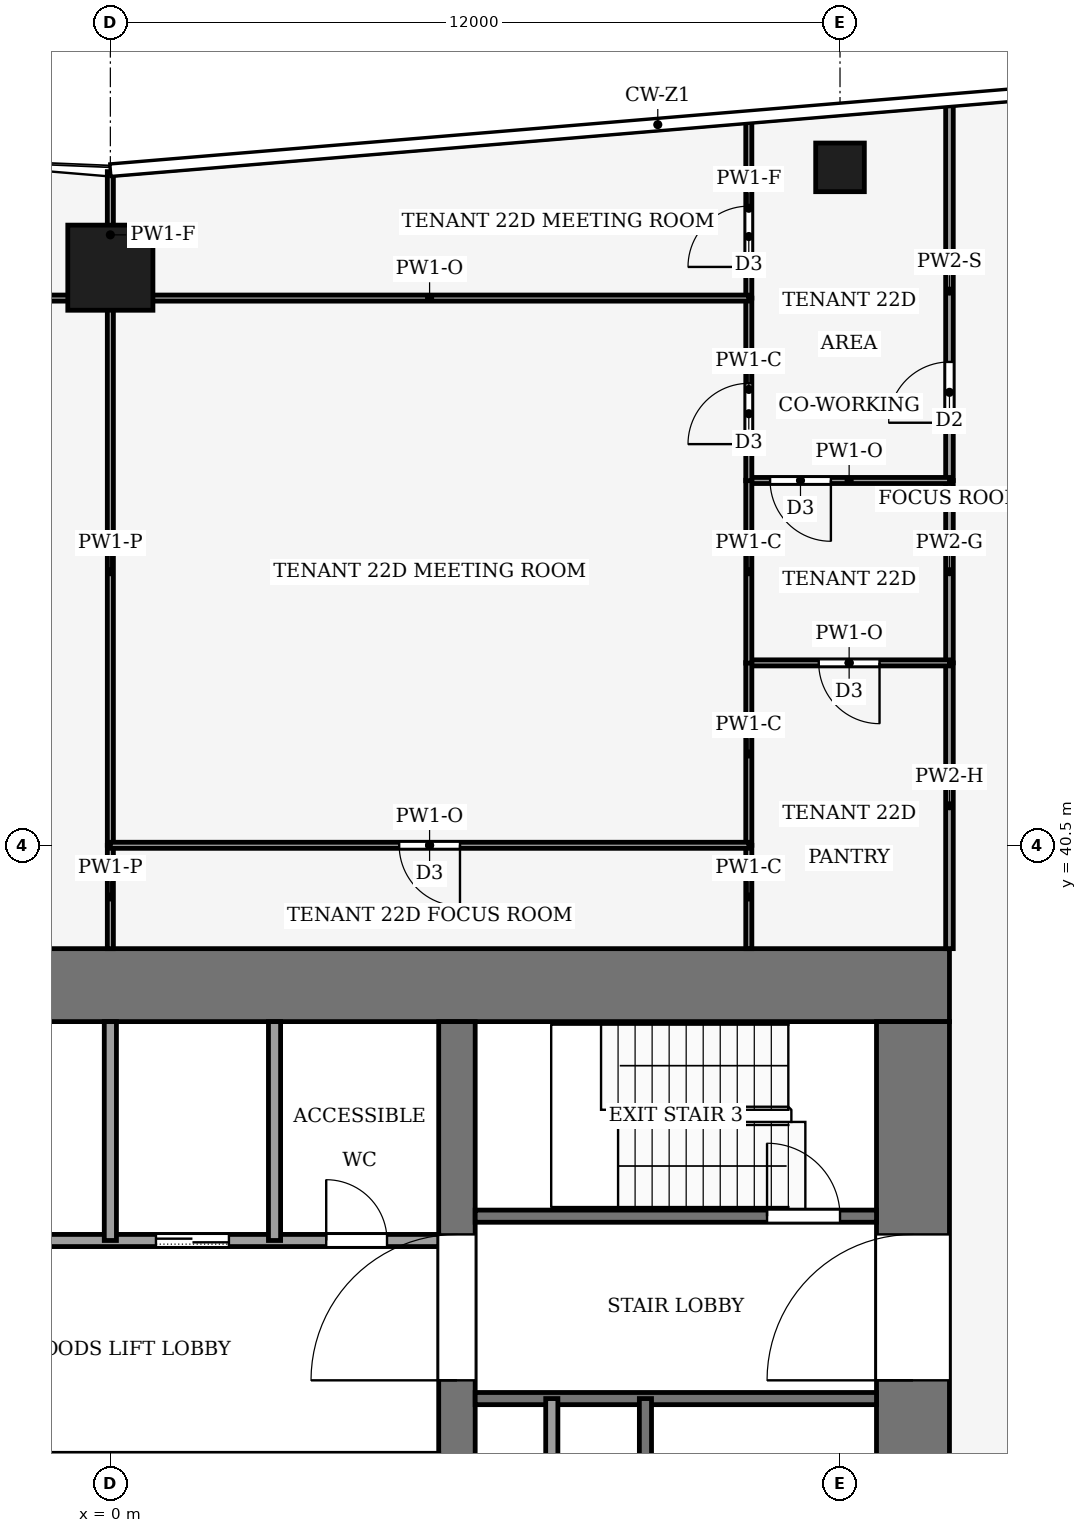
"""IFC4 building model, lengths in metres.
Left out: names, types, materials, properties, quantities, classifications, styles, units other than length and angle.
Written with IfcOpenShell. Run it as: python <this file> out.ifc"""

import sys

from ifc_helpers import new_model, si_unit, direction, frame, frame_2d, origin, origin_2d, place, context, subcontext, project, spatial, rectangle, hollow_rectangle, extrude, element, fill, save


model = new_model("IFC4")
c1 = context("Model", 3, precision=1e-05, world=origin(), true_north=direction((0.0, 1.0)))
c2 = subcontext(c1, "Body", "Model", "MODEL_VIEW")
j1 = project(units=[si_unit("LENGTHUNIT", "METRE"), si_unit("PLANEANGLEUNIT", "RADIAN")], contexts=[c1])
p1 = place(None, origin())
s1 = spatial("IfcSite", under=j1, at=p1, CompositionType="ELEMENT")
p2 = place(p1, origin())
s2 = spatial("IfcBuilding", under=s1, at=p2, CompositionType="ELEMENT")
p3 = place(p2, frame((0.0, 0.0, 98.0)))
s3 = spatial("IfcBuildingStorey", under=s2, at=p3, CompositionType="ELEMENT", Elevation=98.0)
p4 = place(p3, frame((-13.8, 38.2, -0.13), z_axis=(0.0, 0.0, 1.0), x_axis=(1.0, 0.0, 0.0)))
e1 = element("IfcWall", 1, at=p4, inside=s3, PredefinedType="SHEAR", context=c2, shape_type="SweptSolid", body=[
    extrude(rectangle(XDim=27.6, YDim=1.2, at=frame_2d((13.8, 0.0))), origin(), (0.0, 0.0, 1.0), 4.0),
])
p5 = place(p3, frame((13.2, 18.4, -0.13), z_axis=(0.0, 0.0, 1.0), x_axis=(0.0, 1.0, 0.0)))
e2 = element("IfcWall", 2, at=p5, inside=s3, PredefinedType="SHEAR", context=c2, shape_type="SweptSolid", body=[
    extrude(rectangle(XDim=19.2, YDim=1.2, at=frame_2d((9.6, 0.0))), origin(), (0.0, 0.0, 1.0), 4.0),
])
p6 = place(p5, frame((2.8, 0.0, 0.13)))
e3 = element("IfcOpeningElement", 3, at=p6, cuts=e2, PredefinedType="OPENING", context=c2, shape_type="SweptSolid", body=[
    extrude(rectangle(XDim=2.4, YDim=2.4, at=frame_2d((1.2, 1.2))), frame((0.0, 0.61, 0.0), z_axis=(0.0, -1.0, 0.0), x_axis=(1.0, 0.0, 0.0)), (0.0, 0.0, 1.0), 1.22),
])
p7 = place(p5, frame((13.3, 0.0, 0.13)))
e4 = element("IfcOpeningElement", 4, at=p7, cuts=e2, PredefinedType="OPENING", context=c2, shape_type="SweptSolid", body=[
    extrude(rectangle(XDim=2.4, YDim=2.4, at=frame_2d((1.2, 1.2))), frame((0.0, 0.61, 0.0), z_axis=(0.0, -1.0, 0.0), x_axis=(1.0, 0.0, 0.0)), (0.0, 0.0, 1.0), 1.22),
])
p8 = place(p3, frame((5.7, 18.4, -0.13), z_axis=(0.0, 0.0, 1.0), x_axis=(0.0, 1.0, 0.0)))
e5 = element("IfcWall", 5, at=p8, inside=s3, PredefinedType="SHEAR", context=c2, shape_type="SweptSolid", body=[
    extrude(rectangle(XDim=19.2, YDim=0.6, at=frame_2d((9.6, 0.0))), origin(), (0.0, 0.0, 1.0), 4.0),
])
p9 = place(p8, frame((13.3, 0.0, 0.13)))
e6 = element("IfcOpeningElement", 6, at=p9, cuts=e5, PredefinedType="OPENING", context=c2, shape_type="SweptSolid", body=[
    extrude(rectangle(XDim=2.4, YDim=2.4, at=frame_2d((1.2, 1.2))), frame((0.0, 0.31, 0.0), z_axis=(0.0, -1.0, 0.0), x_axis=(1.0, 0.0, 0.0)), (0.0, 0.0, 1.0), 0.62),
])
p10 = place(p3, frame((0.0, 50.0, 0.0), z_axis=(0.0, 0.0, 1.0), x_axis=(1.0, 0.0, 0.0)))
e7 = element("IfcColumn", 7, at=p10, inside=s3, PredefinedType="COLUMN", context=c2, shape_type="SweptSolid", body=[
    extrude(hollow_rectangle(XDim=1.4, YDim=1.4, WallThickness=0.08, at=origin_2d()), origin(), (0.0, 0.0, 1.0), 4.0),
])
p11 = place(p3, frame((12.0, 51.65, 0.0), z_axis=(0.0, 0.0, 1.0), x_axis=(1.0, 0.0, 0.0)))
e8 = element("IfcColumn", 8, at=p11, inside=s3, PredefinedType="COLUMN", context=c2, shape_type="SweptSolid", body=[
    extrude(hollow_rectangle(XDim=0.8, YDim=0.8, WallThickness=0.04, at=origin_2d()), origin(), (0.0, 0.0, 1.0), 4.0),
])
p12 = place(p3, frame((6.0, 31.4, 0.0), z_axis=(0.0, 0.0, 1.0), x_axis=(1.0, 0.0, 0.0)))
e9 = element("IfcWall", 9, at=p12, inside=s3, PredefinedType="PARTITIONING", context=c2, shape_type="SweptSolid", body=[
    extrude(rectangle(XDim=6.6, YDim=0.2, at=frame_2d((3.3, 0.0))), origin(), (0.0, 0.0, 1.0), 3.87),
])
p13 = place(p3, frame((-5.4, 34.0, 0.0), z_axis=(0.0, 0.0, 1.0), x_axis=(1.0, 0.0, 0.0)))
e10 = element("IfcWall", 10, at=p13, inside=s3, PredefinedType="PARTITIONING", context=c2, shape_type="SweptSolid", body=[
    extrude(rectangle(XDim=10.8, YDim=0.2, at=frame_2d((5.4, 0.0))), origin(), (0.0, 0.0, 1.0), 3.87),
])
p14 = place(p13, frame((6.15, 0.0, 0.0)))
e11 = element("IfcOpeningElement", 11, at=p14, cuts=e10, PredefinedType="OPENING", context=c2, shape_type="SweptSolid", body=[
    extrude(rectangle(XDim=1.2, YDim=2.2, at=frame_2d((0.6, 1.1))), frame((0.0, 0.11, 0.0), z_axis=(0.0, -1.0, 0.0), x_axis=(1.0, 0.0, 0.0)), (0.0, 0.0, 1.0), 0.22),
])
p15 = place(p13, frame((8.95, 0.0, 0.0)))
e12 = element("IfcOpeningElement", 12, at=p15, cuts=e10, PredefinedType="OPENING", context=c2, shape_type="SweptSolid", body=[
    extrude(rectangle(XDim=1.0, YDim=2.1, at=frame_2d((0.5, 1.05))), frame((0.0, 0.11, 0.0), z_axis=(0.0, -1.0, 0.0), x_axis=(1.0, 0.0, 0.0)), (0.0, 0.0, 1.0), 0.22),
])
p16 = place(p3, frame((6.0, 34.4, 0.0), z_axis=(0.0, 0.0, 1.0), x_axis=(1.0, 0.0, 0.0)))
e13 = element("IfcWall", 13, at=p16, inside=s3, PredefinedType="PARTITIONING", context=c2, shape_type="SweptSolid", body=[
    extrude(rectangle(XDim=6.6, YDim=0.2, at=frame_2d((3.3, 0.0))), origin(), (0.0, 0.0, 1.0), 3.87),
])
p17 = place(p16, frame((4.8, 0.0, 0.0)))
e14 = element("IfcOpeningElement", 14, at=p17, cuts=e13, PredefinedType="OPENING", context=c2, shape_type="SweptSolid", body=[
    extrude(rectangle(XDim=1.2, YDim=2.2, at=frame_2d((0.6, 1.1))), frame((0.0, 0.11, 0.0), z_axis=(0.0, -1.0, 0.0), x_axis=(1.0, 0.0, 0.0)), (0.0, 0.0, 1.0), 0.22),
])
for number, where, z_axis, x_axis in (
    (15, (0.0, 34.0, 0.0), (0.0, 0.0, 1.0), (0.0, 1.0, 0.0)),
    (16, (2.7, 34.0, 0.0), (0.0, 0.0, 1.0), (0.0, 1.0, 0.0)),
):
    element("IfcWall", number, at=place(p3, frame(where, z_axis=z_axis, x_axis=x_axis)), inside=s3, PredefinedType="PARTITIONING", context=c2, shape_type="SweptSolid", body=[
        extrude(rectangle(XDim=3.6, YDim=0.2, at=frame_2d((1.8, 0.0))), origin(), (0.0, 0.0, 1.0), 3.87),
    ])
for number, where, z_axis, x_axis in (
    (17, (7.26, 24.0, 0.0), (0.0, 0.0, 1.0), (0.0, 1.0, 0.0)),
    (18, (8.8, 24.0, 0.0), (0.0, 0.0, 1.0), (0.0, 1.0, 0.0)),
):
    element("IfcWall", number, at=place(p3, frame(where, z_axis=z_axis, x_axis=x_axis)), inside=s3, PredefinedType="PARTITIONING", context=c2, shape_type="SweptSolid", body=[
        extrude(rectangle(XDim=7.4, YDim=0.2, at=frame_2d((3.7, 0.0))), origin(), (0.0, 0.0, 1.0), 3.87),
    ])
p18 = place(p3, frame((13.8, 43.5, 0.0), z_axis=(0.0, 0.0, 1.0), x_axis=(0.0, -1.0, 0.0)))
e19 = element("IfcWall", 19, at=p18, inside=s3, PredefinedType="PARTITIONING", context=c2, shape_type="SweptSolid", body=[
    extrude(rectangle(XDim=4.7, YDim=0.125, at=frame_2d((2.35, 0.0))), origin(), (0.0, 0.0, 1.0), 3.14),
])
p19 = place(p3, frame((13.8, 46.5, 0.0), z_axis=(0.0, 0.0, 1.0), x_axis=(0.0, -1.0, 0.0)))
e20 = element("IfcWall", 20, at=p19, inside=s3, PredefinedType="PARTITIONING", context=c2, shape_type="SweptSolid", body=[
    extrude(rectangle(XDim=3.0, YDim=0.125, at=frame_2d((1.5, 0.0))), origin(), (0.0, 0.0, 1.0), 3.87),
])
p20 = place(p3, frame((13.8, 46.5, 0.0), z_axis=(0.0, 0.0, 1.0), x_axis=(0.0, 1.0, 0.0)))
e21 = element("IfcWall", 21, at=p20, inside=s3, PredefinedType="PARTITIONING", context=c2, shape_type="SweptSolid", body=[
    extrude(rectangle(XDim=6.23, YDim=0.125, at=frame_2d((3.115, 0.0))), origin(), (0.0, 0.0, 1.0), 3.04),
])
p21 = place(p20, frame((0.95, 0.0, 0.0)))
e22 = element("IfcOpeningElement", 22, at=p21, cuts=e21, PredefinedType="OPENING", context=c2, shape_type="SweptSolid", body=[
    extrude(rectangle(XDim=1.0, YDim=2.1, at=frame_2d((0.5, 1.05))), frame((0.0, 0.073, 0.0), z_axis=(0.0, -1.0, 0.0), x_axis=(1.0, 0.0, 0.0)), (0.0, 0.0, 1.0), 0.145),
])
p22 = place(p3, frame((-7.5, 49.5, 0.0), z_axis=(0.0, 0.0, 1.0), x_axis=(1.0, 0.0, 0.0)))
e23 = element("IfcWall", 23, at=p22, inside=s3, PredefinedType="PARTITIONING", context=c2, shape_type="SweptSolid", body=[
    extrude(rectangle(XDim=7.5, YDim=0.1, at=frame_2d((3.75, 0.0))), origin(), (0.0, 0.0, 1.0), 3.39),
])
p23 = place(p22, frame((2.85, 0.0, 0.0)))
e24 = element("IfcOpeningElement", 24, at=p23, cuts=e23, PredefinedType="OPENING", context=c2, shape_type="SweptSolid", body=[
    extrude(rectangle(XDim=1.0, YDim=2.1, at=frame_2d((0.5, 1.05))), frame((0.0, 0.06, 0.0), z_axis=(0.0, -1.0, 0.0), x_axis=(1.0, 0.0, 0.0)), (0.0, 0.0, 1.0), 0.12),
])
p24 = place(p3, frame((0.0, 38.8, 0.0), z_axis=(0.0, 0.0, 1.0), x_axis=(0.0, 1.0, 0.0)))
e25 = element("IfcWall", 25, at=p24, inside=s3, PredefinedType="PARTITIONING", context=c2, shape_type="SweptSolid", body=[
    extrude(rectangle(XDim=1.7, YDim=0.1, at=frame_2d((0.85, 0.0))), origin(), (0.0, 0.0, 1.0), 3.44),
])
p25 = place(p3, frame((0.0, 40.5, 0.0), z_axis=(0.0, 0.0, 1.0), x_axis=(0.0, 1.0, 0.0)))
e26 = element("IfcWall", 26, at=p25, inside=s3, PredefinedType="PARTITIONING", context=c2, shape_type="SweptSolid", body=[
    extrude(rectangle(XDim=9.0, YDim=0.1, at=frame_2d((4.5, 0.0))), origin(), (0.0, 0.0, 1.0), 3.44),
])
p26 = place(p3, frame((0.0, 49.5, 0.0), z_axis=(0.0, 0.0, 1.0), x_axis=(0.0, 1.0, 0.0)))
e27 = element("IfcWall", 27, at=p26, inside=s3, PredefinedType="PARTITIONING", context=c2, shape_type="SweptSolid", body=[
    extrude(rectangle(XDim=2.08, YDim=0.1, at=frame_2d((1.04, 0.0))), origin(), (0.0, 0.0, 1.0), 3.04),
])
p27 = place(p3, frame((13.8, 43.5, 0.0), z_axis=(0.0, 0.0, 1.0), x_axis=(-1.0, 0.0, 0.0)))
e28 = element("IfcWall", 28, at=p27, inside=s3, PredefinedType="PARTITIONING", context=c2, shape_type="SweptSolid", body=[
    extrude(rectangle(XDim=3.3, YDim=0.1, at=frame_2d((1.65, 0.0))), origin(), (0.0, 0.0, 1.0), 3.39),
])
p28 = place(p27, frame((1.15, 0.0, 0.0)))
e29 = element("IfcOpeningElement", 29, at=p28, cuts=e28, PredefinedType="OPENING", context=c2, shape_type="SweptSolid", body=[
    extrude(rectangle(XDim=1.0, YDim=2.1, at=frame_2d((0.5, 1.05))), frame((0.0, 0.06, 0.0), z_axis=(0.0, -1.0, 0.0), x_axis=(1.0, 0.0, 0.0)), (0.0, 0.0, 1.0), 0.12),
])
p29 = place(p3, frame((10.5, 40.5, 0.0), z_axis=(0.0, 0.0, 1.0), x_axis=(0.0, -1.0, 0.0)))
e30 = element("IfcWall", 30, at=p29, inside=s3, PredefinedType="PARTITIONING", context=c2, shape_type="SweptSolid", body=[
    extrude(rectangle(XDim=1.7, YDim=0.1, at=frame_2d((0.85, 0.0))), origin(), (0.0, 0.0, 1.0), 3.87),
])
p30 = place(p3, frame((10.5, 43.504, 0.0), z_axis=(0.0, 0.0, 1.0), x_axis=(0.0, -1.0, 0.0)))
e31 = element("IfcWall", 31, at=p30, inside=s3, PredefinedType="PARTITIONING", context=c2, shape_type="SweptSolid", body=[
    extrude(rectangle(XDim=3.004, YDim=0.1, at=frame_2d((1.502, 0.0))), origin(), (0.0, 0.0, 1.0), 3.87),
])
p31 = place(p3, frame((13.8, 46.5, 0.0), z_axis=(0.0, 0.0, 1.0), x_axis=(-1.0, 0.0, 0.0)))
e32 = element("IfcWall", 32, at=p31, inside=s3, PredefinedType="PARTITIONING", context=c2, shape_type="SweptSolid", body=[
    extrude(rectangle(XDim=3.3, YDim=0.1, at=frame_2d((1.65, 0.0))), origin(), (0.0, 0.0, 1.0), 3.39),
])
p32 = place(p31, frame((1.95, 0.0, 0.0)))
e33 = element("IfcOpeningElement", 33, at=p32, cuts=e32, PredefinedType="OPENING", context=c2, shape_type="SweptSolid", body=[
    extrude(rectangle(XDim=1.0, YDim=2.1, at=frame_2d((0.5, 1.05))), frame((0.0, 0.06, 0.0), z_axis=(0.0, -1.0, 0.0), x_axis=(1.0, 0.0, 0.0)), (0.0, 0.0, 1.0), 0.12),
])
p33 = place(p3, frame((10.5, 46.504, 0.0), z_axis=(0.0, 0.0, 1.0), x_axis=(0.0, -1.0, 0.0)))
e34 = element("IfcWall", 34, at=p33, inside=s3, PredefinedType="PARTITIONING", context=c2, shape_type="SweptSolid", body=[
    extrude(rectangle(XDim=3.008, YDim=0.1, at=frame_2d((1.504, 0.0))), origin(), (0.0, 0.0, 1.0), 3.87),
])
p34 = place(p3, frame((10.5, 46.496, 0.0), z_axis=(0.0, 0.0, 1.0), x_axis=(0.0, 1.0, 0.0)))
e35 = element("IfcWall", 35, at=p34, inside=s3, PredefinedType="PARTITIONING", context=c2, shape_type="SweptSolid", body=[
    extrude(rectangle(XDim=3.004, YDim=0.1, at=frame_2d((1.502, 0.0))), origin(), (0.0, 0.0, 1.0), 3.87),
])
p35 = place(p34, frame((0.602, 0.0, 0.0)))
e36 = element("IfcOpeningElement", 36, at=p35, cuts=e35, PredefinedType="OPENING", context=c2, shape_type="SweptSolid", body=[
    extrude(rectangle(XDim=1.0, YDim=2.1, at=frame_2d((0.5, 1.05))), frame((0.0, 0.06, 0.0), z_axis=(0.0, -1.0, 0.0), x_axis=(1.0, 0.0, 0.0)), (0.0, 0.0, 1.0), 0.12),
])
p36 = place(p3, frame((10.5, 49.5, 0.0), z_axis=(0.0, 0.0, 1.0), x_axis=(0.0, 1.0, 0.0)))
e37 = element("IfcWall", 37, at=p36, inside=s3, PredefinedType="PARTITIONING", context=c2, shape_type="SweptSolid", body=[
    extrude(rectangle(XDim=2.955, YDim=0.1, at=frame_2d((1.478, 0.0))), origin(), (0.0, 0.0, 1.0), 3.04),
])
p37 = place(p36, frame((0.512, 0.0, 0.0)))
e38 = element("IfcOpeningElement", 38, at=p37, cuts=e37, PredefinedType="OPENING", context=c2, shape_type="SweptSolid", body=[
    extrude(rectangle(XDim=1.0, YDim=2.1, at=frame_2d((0.5, 1.05))), frame((0.0, 0.06, 0.0), z_axis=(0.0, -1.0, 0.0), x_axis=(1.0, 0.0, 0.0)), (0.0, 0.0, 1.0), 0.12),
])
p38 = place(p3, frame((10.5, 40.5, 0.0), z_axis=(0.0, 0.0, 1.0), x_axis=(-1.0, 0.0, 0.0)))
e39 = element("IfcWall", 39, at=p38, inside=s3, PredefinedType="PARTITIONING", context=c2, shape_type="SweptSolid", body=[
    extrude(rectangle(XDim=10.5, YDim=0.1, at=frame_2d((5.25, 0.0))), origin(), (0.0, 0.0, 1.0), 3.39),
])
p39 = place(p38, frame((4.75, 0.0, 0.0)))
e40 = element("IfcOpeningElement", 40, at=p39, cuts=e39, PredefinedType="OPENING", context=c2, shape_type="SweptSolid", body=[
    extrude(rectangle(XDim=1.0, YDim=2.1, at=frame_2d((0.5, 1.05))), frame((0.0, 0.06, 0.0), z_axis=(0.0, -1.0, 0.0), x_axis=(1.0, 0.0, 0.0)), (0.0, 0.0, 1.0), 0.12),
])
p40 = place(p3, frame((10.5, 49.5, 0.0), z_axis=(0.0, 0.0, 1.0), x_axis=(-1.0, 0.0, 0.0)))
e41 = element("IfcWall", 41, at=p40, inside=s3, PredefinedType="PARTITIONING", context=c2, shape_type="SweptSolid", body=[
    extrude(rectangle(XDim=10.5, YDim=0.1, at=frame_2d((5.25, 0.0))), origin(), (0.0, 0.0, 1.0), 3.39),
])
p41 = place(p14, origin())
e42 = element("IfcDoor", 42, at=p41, inside=s3, OperationType="SLIDING_TO_LEFT", PredefinedType="DOOR", context=c2, shape_type="SweptSolid", body=[
    extrude(rectangle(XDim=1.2, YDim=2.2, at=frame_2d((0.6, 1.1))), frame((0.0, 0.025, 0.0), z_axis=(0.0, -1.0, 0.0), x_axis=(1.0, 0.0, 0.0)), (0.0, 0.0, 1.0), 0.05),
])
fill(e11, e42)
p42 = place(p15, origin())
e43 = element("IfcDoor", 43, at=p42, inside=s3, OperationType="SINGLE_SWING_LEFT", PredefinedType="DOOR", context=c2, shape_type="SweptSolid", body=[
    extrude(rectangle(XDim=1.0, YDim=2.1, at=frame_2d((0.5, 1.05))), frame((0.0, 0.025, 0.0), z_axis=(0.0, -1.0, 0.0), x_axis=(1.0, 0.0, 0.0)), (0.0, 0.0, 1.0), 0.05),
])
fill(e12, e43)
p43 = place(p17, origin())
e44 = element("IfcDoor", 44, at=p43, inside=s3, OperationType="SINGLE_SWING_RIGHT", PredefinedType="DOOR", context=c2, shape_type="SweptSolid", body=[
    extrude(rectangle(XDim=1.2, YDim=2.2, at=frame_2d((0.6, 1.1))), frame((0.0, 0.025, 0.0), z_axis=(0.0, -1.0, 0.0), x_axis=(1.0, 0.0, 0.0)), (0.0, 0.0, 1.0), 0.05),
])
fill(e14, e44)
p44 = place(p9, origin())
e45 = element("IfcDoor", 45, at=p44, inside=s3, OperationType="DOUBLE_DOOR_SINGLE_SWING", PredefinedType="DOOR", context=c2, shape_type="SweptSolid", body=[
    extrude(rectangle(XDim=2.4, YDim=2.4, at=frame_2d((1.2, 1.2))), frame((0.0, 0.025, 0.0), z_axis=(0.0, -1.0, 0.0), x_axis=(1.0, 0.0, 0.0)), (0.0, 0.0, 1.0), 0.05),
])
fill(e6, e45)
p45 = place(p7, origin())
e46 = element("IfcDoor", 46, at=p45, inside=s3, OperationType="DOUBLE_DOOR_SINGLE_SWING", PredefinedType="DOOR", context=c2, shape_type="SweptSolid", body=[
    extrude(rectangle(XDim=2.4, YDim=2.4, at=frame_2d((1.2, 1.2))), frame((0.0, 0.025, 0.0), z_axis=(0.0, -1.0, 0.0), x_axis=(1.0, 0.0, 0.0)), (0.0, 0.0, 1.0), 0.05),
])
fill(e4, e46)
p46 = place(p21, origin())
e47 = element("IfcDoor", 47, at=p46, inside=s3, OperationType="SINGLE_SWING_LEFT", PredefinedType="DOOR", context=c2, shape_type="SweptSolid", body=[
    extrude(rectangle(XDim=1.0, YDim=2.1, at=frame_2d((0.5, 1.05))), frame((0.0, 0.025, 0.0), z_axis=(0.0, -1.0, 0.0), x_axis=(1.0, 0.0, 0.0)), (0.0, 0.0, 1.0), 0.05),
])
fill(e22, e47)
p47 = place(p28, origin())
e48 = element("IfcDoor", 48, at=p47, inside=s3, OperationType="SINGLE_SWING_RIGHT", PredefinedType="DOOR", context=c2, shape_type="SweptSolid", body=[
    extrude(rectangle(XDim=1.0, YDim=2.1, at=frame_2d((0.5, 1.05))), frame((0.0, 0.025, 0.0), z_axis=(0.0, -1.0, 0.0), x_axis=(1.0, 0.0, 0.0)), (0.0, 0.0, 1.0), 0.05),
])
fill(e29, e48)
p48 = place(p32, origin())
e49 = element("IfcDoor", 49, at=p48, inside=s3, OperationType="SINGLE_SWING_RIGHT", PredefinedType="DOOR", context=c2, shape_type="SweptSolid", body=[
    extrude(rectangle(XDim=1.0, YDim=2.1, at=frame_2d((0.5, 1.05))), frame((0.0, 0.025, 0.0), z_axis=(0.0, -1.0, 0.0), x_axis=(1.0, 0.0, 0.0)), (0.0, 0.0, 1.0), 0.05),
])
fill(e33, e49)
p49 = place(p35, origin())
e50 = element("IfcDoor", 50, at=p49, inside=s3, OperationType="SINGLE_SWING_LEFT", PredefinedType="DOOR", context=c2, shape_type="SweptSolid", body=[
    extrude(rectangle(XDim=1.0, YDim=2.1, at=frame_2d((0.5, 1.05))), frame((0.0, 0.025, 0.0), z_axis=(0.0, -1.0, 0.0), x_axis=(1.0, 0.0, 0.0)), (0.0, 0.0, 1.0), 0.05),
])
fill(e36, e50)
p50 = place(p37, origin())
e51 = element("IfcDoor", 51, at=p50, inside=s3, OperationType="SINGLE_SWING_LEFT", PredefinedType="DOOR", context=c2, shape_type="SweptSolid", body=[
    extrude(rectangle(XDim=1.0, YDim=2.1, at=frame_2d((0.5, 1.05))), frame((0.0, 0.025, 0.0), z_axis=(0.0, -1.0, 0.0), x_axis=(1.0, 0.0, 0.0)), (0.0, 0.0, 1.0), 0.05),
])
fill(e38, e51)
p51 = place(p39, origin())
e52 = element("IfcDoor", 52, at=p51, inside=s3, OperationType="SINGLE_SWING_RIGHT", PredefinedType="DOOR", context=c2, shape_type="SweptSolid", body=[
    extrude(rectangle(XDim=1.0, YDim=2.1, at=frame_2d((0.5, 1.05))), frame((0.0, 0.025, 0.0), z_axis=(0.0, -1.0, 0.0), x_axis=(1.0, 0.0, 0.0)), (0.0, 0.0, 1.0), 0.05),
])
fill(e40, e52)
save(model, sys.argv[1])
